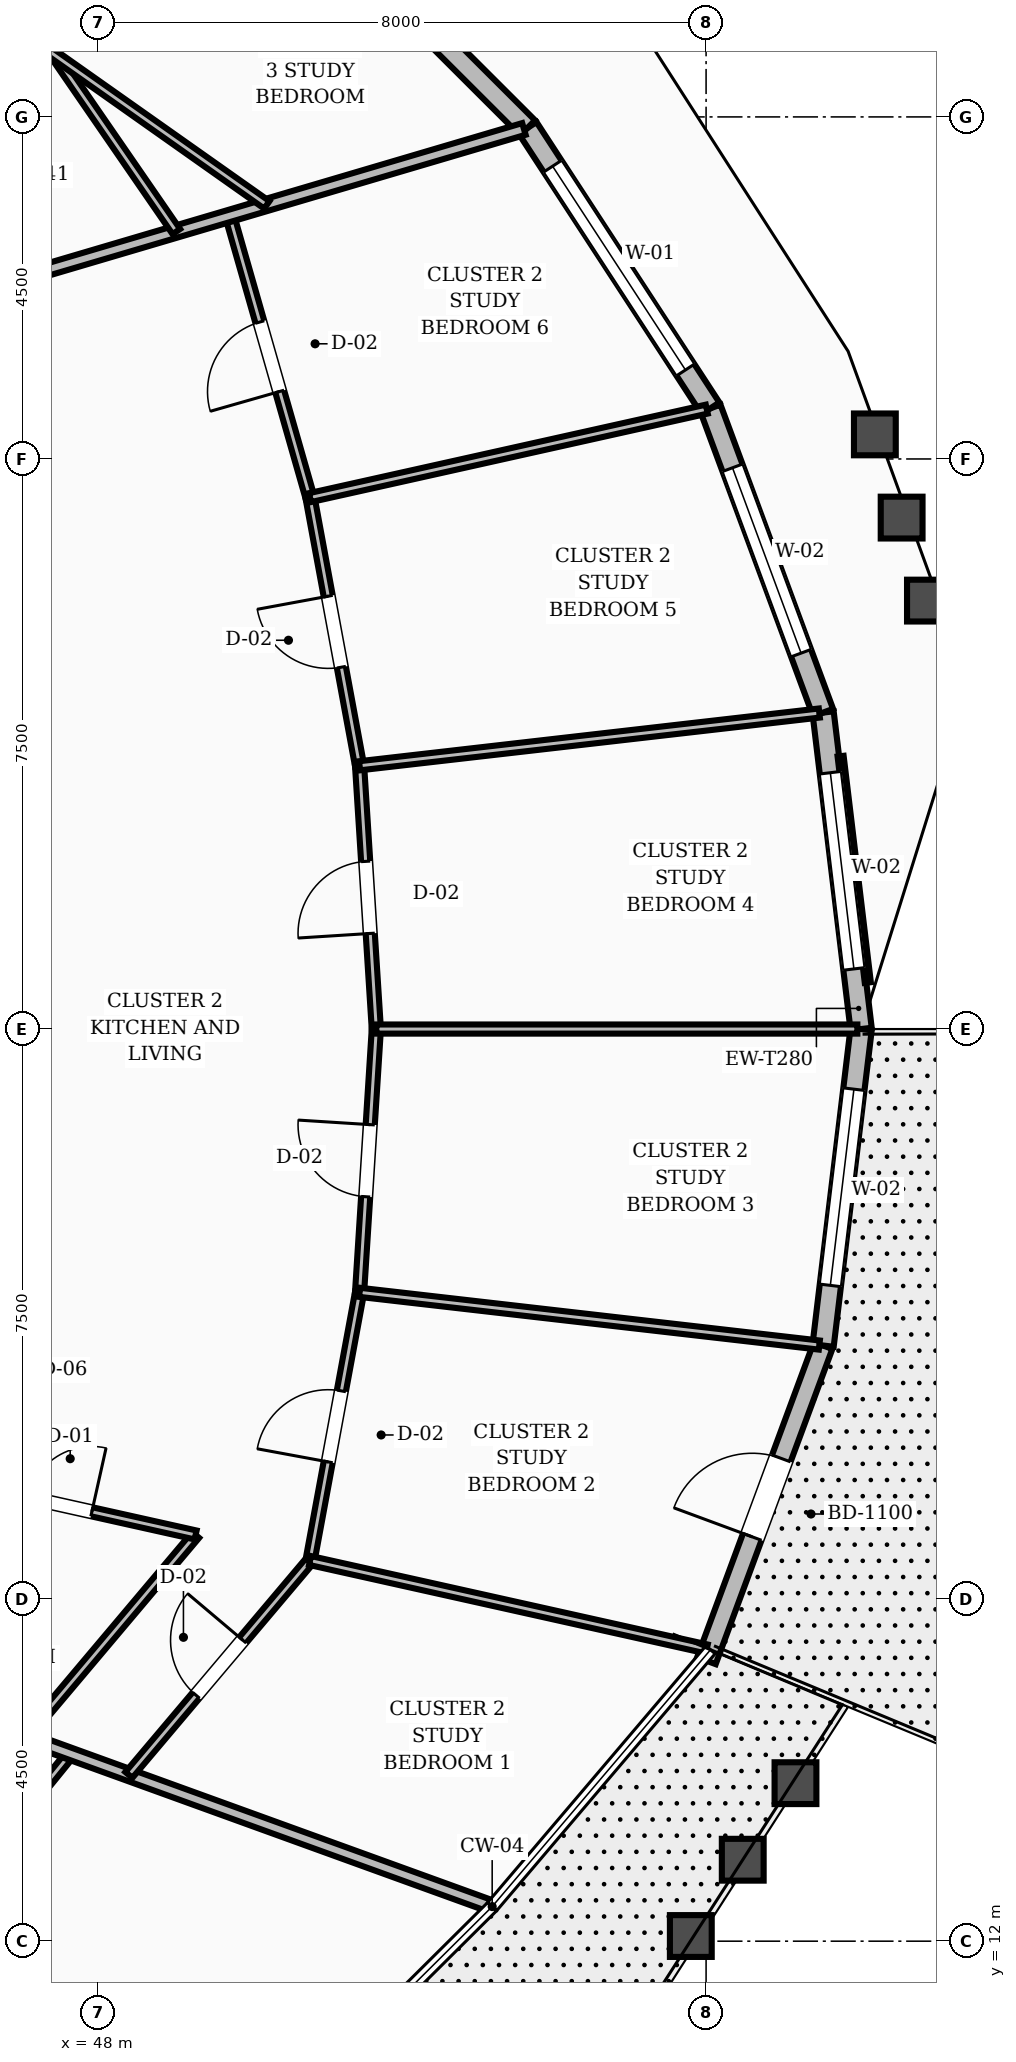
"""IFC4 building model, lengths in metres.
Left out: names, types, materials, properties, quantities, classifications, styles, units other than length and angle.
Written with IfcOpenShell. Run it as: python <this file> out.ifc"""

import sys

from ifc_helpers import new_model, si_unit, direction, frame, frame_2d, origin, place, context, subcontext, project, spatial, rectangle, extrude, element, fill, save


model = new_model("IFC4")
c1 = context("Model", 3, precision=1e-05, world=origin(), true_north=direction((0.0, 1.0)))
c2 = subcontext(c1, "Body", "Model", "MODEL_VIEW")
j1 = project(units=[si_unit("LENGTHUNIT", "METRE"), si_unit("PLANEANGLEUNIT", "RADIAN")], contexts=[c1])
p1 = place(None, origin())
s1 = spatial("IfcSite", under=j1, at=p1, CompositionType="ELEMENT")
p2 = place(p1, origin())
s2 = spatial("IfcBuilding", under=s1, at=p2, CompositionType="ELEMENT")
p3 = place(p2, frame((0.0, 0.0, 174.8)))
s3 = spatial("IfcBuildingStorey", under=s2, at=p3, CompositionType="ELEMENT", Elevation=174.8)
p4 = place(p3, frame((58.04, 24.0, 0.0), z_axis=(0.0, 0.0, 1.0), x_axis=(-0.119361035634, 0.992850916892, 0.0)))
e1 = element("IfcWall", 1, at=p4, inside=s3, PredefinedType="STANDARD", context=c2, shape_type="SweptSolid", body=[
    extrude(rectangle(XDim=4.193, YDim=0.28, at=frame_2d((2.097, 0.0))), origin(), (0.0, 0.0, 1.0), 2.82),
])
p5 = place(p4, frame((0.797, 0.0, 0.8)))
e2 = element("IfcOpeningElement", 2, at=p5, cuts=e1, PredefinedType="OPENING", context=c2, shape_type="SweptSolid", body=[
    extrude(rectangle(XDim=2.6, YDim=1.65, at=frame_2d((1.3, 0.825))), frame((0.0, 0.15, 0.0), z_axis=(0.0, -1.0, 0.0), x_axis=(1.0, 0.0, 0.0)), (0.0, 0.0, 1.0), 0.3),
])
p6 = place(p3, frame((57.54, 28.163, 0.0), z_axis=(0.0, 0.0, 1.0), x_axis=(-0.347096410893, 0.93782945227, 0.0)))
e3 = element("IfcWall", 3, at=p6, inside=s3, PredefinedType="STANDARD", context=c2, shape_type="SweptSolid", body=[
    extrude(rectangle(XDim=4.269, YDim=0.28, at=frame_2d((2.134, 0.0))), origin(), (0.0, 0.0, 1.0), 2.82),
])
p7 = place(p6, frame((0.834, 0.0, 0.8)))
e4 = element("IfcOpeningElement", 4, at=p7, cuts=e3, PredefinedType="OPENING", context=c2, shape_type="SweptSolid", body=[
    extrude(rectangle(XDim=2.6, YDim=1.65, at=frame_2d((1.3, 0.825))), frame((0.0, 0.15, 0.0), z_axis=(0.0, -1.0, 0.0), x_axis=(1.0, 0.0, 0.0)), (0.0, 0.0, 1.0), 0.3),
])
p8 = place(p3, frame((56.058, 32.167, 0.0), z_axis=(0.0, 0.0, 1.0), x_axis=(-0.54628130625, 0.837601775573, 0.0)))
e5 = element("IfcWall", 5, at=p8, inside=s3, PredefinedType="STANDARD", context=c2, shape_type="SweptSolid", body=[
    extrude(rectangle(XDim=4.405, YDim=0.28, at=frame_2d((2.202, 0.0))), origin(), (0.0, 0.0, 1.0), 2.82),
])
p9 = place(p8, frame((0.602, 0.0, 0.8)))
e6 = element("IfcOpeningElement", 6, at=p9, cuts=e5, PredefinedType="OPENING", context=c2, shape_type="SweptSolid", body=[
    extrude(rectangle(XDim=3.2, YDim=1.65, at=frame_2d((1.6, 0.825))), frame((0.0, 0.15, 0.0), z_axis=(0.0, -1.0, 0.0), x_axis=(1.0, 0.0, 0.0)), (0.0, 0.0, 1.0), 0.3),
])
p10 = place(p3, frame((53.652, 35.856, 0.0), z_axis=(0.0, 0.0, 1.0), x_axis=(-0.707640043992, 0.706573115919, 0.0)))
e7 = element("IfcWall", 7, at=p10, inside=s3, PredefinedType="STANDARD", context=c2, shape_type="SweptSolid", body=[
    extrude(rectangle(XDim=4.576, YDim=0.28, at=frame_2d((2.288, 0.0))), origin(), (0.0, 0.0, 1.0), 2.82),
])
p11 = place(p3, frame((56.005, 15.69, 0.0), z_axis=(0.0, 0.0, 1.0), x_axis=(0.347096775118, 0.937829317468, 0.0)))
e8 = element("IfcWall", 8, at=p11, inside=s3, PredefinedType="STANDARD", context=c2, shape_type="SweptSolid", body=[
    extrude(rectangle(XDim=4.422, YDim=0.26, at=frame_2d((2.211, 0.0))), origin(), (0.0, 0.0, 1.0), 2.82),
])
p12 = place(p11, frame((1.738, 0.0, 0.0)))
e9 = element("IfcOpeningElement", 9, at=p12, cuts=e8, PredefinedType="OPENING", context=c2, shape_type="SweptSolid", body=[
    extrude(rectangle(XDim=1.1, YDim=2.15, at=frame_2d((0.55, 1.075))), frame((0.0, 0.14, 0.0), z_axis=(0.0, -1.0, 0.0), x_axis=(1.0, 0.0, 0.0)), (0.0, 0.0, 1.0), 0.28),
])
p13 = place(p3, frame((57.54, 19.837, 0.0), z_axis=(0.0, 0.0, 1.0), x_axis=(0.119361035634, 0.992850916892, 0.0)))
e10 = element("IfcWall", 10, at=p13, inside=s3, PredefinedType="STANDARD", context=c2, shape_type="SweptSolid", body=[
    extrude(rectangle(XDim=4.193, YDim=0.28, at=frame_2d((2.097, 0.0))), origin(), (0.0, 0.0, 1.0), 2.82),
])
p14 = place(p13, frame((0.797, 0.0, 0.8)))
e11 = element("IfcOpeningElement", 11, at=p14, cuts=e10, PredefinedType="OPENING", context=c2, shape_type="SweptSolid", body=[
    extrude(rectangle(XDim=2.6, YDim=1.65, at=frame_2d((1.3, 0.825))), frame((0.0, 0.15, 0.0), z_axis=(0.0, -1.0, 0.0), x_axis=(1.0, 0.0, 0.0)), (0.0, 0.0, 1.0), 0.3),
])
p15 = place(p3, frame((45.424, 11.74, 0.0), z_axis=(0.0, 0.0, 1.0), x_axis=(0.630511474319, 0.776179928079, 0.0)))
e12 = element("IfcWall", 12, at=p15, inside=s3, PredefinedType="PARTITIONING", context=c2, shape_type="SweptSolid", body=[
    extrude(rectangle(XDim=3.511, YDim=0.12, at=frame_2d((1.756, 0.0))), origin(), (0.0, 0.0, 1.0), 2.8),
])
p16 = place(p3, frame((44.65, 15.548, 0.0), z_axis=(0.0, 0.0, 1.0), x_axis=(0.940209575336, -0.340596468636, 0.0)))
e13 = element("IfcWall", 13, at=p16, inside=s3, PredefinedType="SOLIDWALL", context=c2, shape_type="SweptSolid", body=[
    extrude(rectangle(XDim=9.029, YDim=0.16, at=frame_2d((4.514, 0.0))), origin(), (0.0, 0.0, 1.0), 2.8),
])
p17 = place(p3, frame((47.04, 14.682, 0.0), z_axis=(0.0, 0.0, 1.0), x_axis=(0.644463857784, 0.764634772954, 0.0)))
e14 = element("IfcWall", 14, at=p17, inside=s3, PredefinedType="PARTITIONING", context=c2, shape_type="SweptSolid", body=[
    extrude(rectangle(XDim=3.482, YDim=0.12, at=frame_2d((1.741, 0.0))), origin(), (0.0, 0.0, 1.0), 2.8),
])
p18 = place(p3, frame((46.65, 17.932, 0.0), z_axis=(0.0, 0.0, 1.0), x_axis=(0.976010083103, -0.217725326231, 0.0)))
e15 = element("IfcWall", 15, at=p18, inside=s3, PredefinedType="PARTITIONING", context=c2, shape_type="SweptSolid", body=[
    extrude(rectangle(XDim=2.699, YDim=0.12, at=frame_2d((1.35, 0.0))), origin(), (0.0, 0.0, 1.0), 2.8),
])
p19 = place(p18, frame((0.44, 0.0, 0.0)))
e16 = element("IfcOpeningElement", 16, at=p19, cuts=e15, PredefinedType="OPENING", context=c2, shape_type="SweptSolid", body=[
    extrude(rectangle(XDim=0.86, YDim=2.1, at=frame_2d((0.43, 1.05))), frame((0.0, 0.07, 0.0), z_axis=(0.0, -1.0, 0.0), x_axis=(1.0, 0.0, 0.0)), (0.0, 0.0, 1.0), 0.14),
])
p20 = place(p3, frame((48.406, 14.187, 0.0), z_axis=(0.0, 0.0, 1.0), x_axis=(0.645325713634, 0.763907535846, 0.0)))
e17 = element("IfcWall", 17, at=p20, inside=s3, PredefinedType="PARTITIONING", context=c2, shape_type="SweptSolid", body=[
    extrude(rectangle(XDim=3.694, YDim=0.12, at=frame_2d((1.847, 0.0))), origin(), (0.0, 0.0, 1.0), 2.8),
])
p21 = place(p20, frame((1.372, 0.0, 0.0)))
e18 = element("IfcOpeningElement", 18, at=p21, cuts=e17, PredefinedType="OPENING", context=c2, shape_type="SweptSolid", body=[
    extrude(rectangle(XDim=0.95, YDim=2.1, at=frame_2d((0.475, 1.05))), frame((0.0, 0.07, 0.0), z_axis=(0.0, -1.0, 0.0), x_axis=(1.0, 0.0, 0.0)), (0.0, 0.0, 1.0), 0.14),
])
p22 = place(p3, frame((50.789, 17.009, 0.0), z_axis=(0.0, 0.0, 1.0), x_axis=(0.18176514898, 0.983341970332, 0.0)))
e19 = element("IfcWall", 19, at=p22, inside=s3, PredefinedType="PARTITIONING", context=c2, shape_type="SweptSolid", body=[
    extrude(rectangle(XDim=3.588, YDim=0.12, at=frame_2d((1.794, 0.0))), origin(), (0.0, 0.0, 1.0), 2.8),
])
p23 = place(p22, frame((1.319, 0.0, 0.0)))
e20 = element("IfcOpeningElement", 20, at=p23, cuts=e19, PredefinedType="OPENING", context=c2, shape_type="SweptSolid", body=[
    extrude(rectangle(XDim=0.95, YDim=2.1, at=frame_2d((0.475, 1.05))), frame((0.0, 0.07, 0.0), z_axis=(0.0, -1.0, 0.0), x_axis=(1.0, 0.0, 0.0)), (0.0, 0.0, 1.0), 0.14),
])
p24 = place(p3, frame((50.789, 17.009, 0.0), z_axis=(0.0, 0.0, 1.0), x_axis=(0.976023513378, -0.217665112806, 0.0)))
e21 = element("IfcWall", 21, at=p24, inside=s3, PredefinedType="PARTITIONING", context=c2, shape_type="SweptSolid", body=[
    extrude(rectangle(XDim=5.348, YDim=0.12, at=frame_2d((2.674, 0.0))), origin(), (0.0, 0.0, 1.0), 2.8),
])
p25 = place(p3, frame((51.441, 20.536, 0.0), z_axis=(0.0, 0.0, 1.0), x_axis=(0.063451217103, 0.997984941293, 0.0)))
e22 = element("IfcWall", 22, at=p25, inside=s3, PredefinedType="PARTITIONING", context=c2, shape_type="SweptSolid", body=[
    extrude(rectangle(XDim=3.471, YDim=0.12, at=frame_2d((1.735, 0.0))), origin(), (0.0, 0.0, 1.0), 2.8),
])
p26 = place(p25, frame((1.26, 0.0, 0.0)))
e23 = element("IfcOpeningElement", 23, at=p26, cuts=e22, PredefinedType="OPENING", context=c2, shape_type="SweptSolid", body=[
    extrude(rectangle(XDim=0.95, YDim=2.1, at=frame_2d((0.475, 1.05))), frame((0.0, 0.07, 0.0), z_axis=(0.0, -1.0, 0.0), x_axis=(1.0, 0.0, 0.0)), (0.0, 0.0, 1.0), 0.14),
])
p27 = place(p3, frame((51.441, 20.536, 0.0), z_axis=(0.0, 0.0, 1.0), x_axis=(0.993484761462, -0.11396503298, 0.0)))
e24 = element("IfcWall", 24, at=p27, inside=s3, PredefinedType="PARTITIONING", context=c2, shape_type="SweptSolid", body=[
    extrude(rectangle(XDim=6.088, YDim=0.12, at=frame_2d((3.044, 0.0))), origin(), (0.0, 0.0, 1.0), 2.8),
])
p28 = place(p3, frame((51.662, 24.0, 0.0), z_axis=(0.0, 0.0, 1.0), x_axis=(-0.063451217103, 0.997984941293, 0.0)))
e25 = element("IfcWall", 25, at=p28, inside=s3, PredefinedType="PARTITIONING", context=c2, shape_type="SweptSolid", body=[
    extrude(rectangle(XDim=3.471, YDim=0.12, at=frame_2d((1.735, 0.0))), origin(), (0.0, 0.0, 1.0), 2.8),
])
p29 = place(p28, frame((1.26, 0.0, 0.0)))
e26 = element("IfcOpeningElement", 26, at=p29, cuts=e25, PredefinedType="OPENING", context=c2, shape_type="SweptSolid", body=[
    extrude(rectangle(XDim=0.95, YDim=2.1, at=frame_2d((0.475, 1.05))), frame((0.0, 0.07, 0.0), z_axis=(0.0, -1.0, 0.0), x_axis=(1.0, 0.0, 0.0)), (0.0, 0.0, 1.0), 0.14),
])
p30 = place(p3, frame((51.662, 24.0, 0.0), z_axis=(0.0, 0.0, 1.0), x_axis=(1.0, 0.0, 0.0)))
e27 = element("IfcWall", 27, at=p30, inside=s3, PredefinedType="PARTITIONING", context=c2, shape_type="SweptSolid", body=[
    extrude(rectangle(XDim=6.328, YDim=0.12, at=frame_2d((3.164, 0.0))), origin(), (0.0, 0.0, 1.0), 2.8),
])
p31 = place(p3, frame((51.441, 27.464, 0.0), z_axis=(0.0, 0.0, 1.0), x_axis=(-0.18176514898, 0.983341970332, 0.0)))
e28 = element("IfcWall", 28, at=p31, inside=s3, PredefinedType="PARTITIONING", context=c2, shape_type="SweptSolid", body=[
    extrude(rectangle(XDim=3.588, YDim=0.12, at=frame_2d((1.794, 0.0))), origin(), (0.0, 0.0, 1.0), 2.8),
])
p32 = place(p31, frame((1.319, 0.0, 0.0)))
e29 = element("IfcOpeningElement", 29, at=p32, cuts=e28, PredefinedType="OPENING", context=c2, shape_type="SweptSolid", body=[
    extrude(rectangle(XDim=0.95, YDim=2.1, at=frame_2d((0.475, 1.05))), frame((0.0, 0.07, 0.0), z_axis=(0.0, -1.0, 0.0), x_axis=(1.0, 0.0, 0.0)), (0.0, 0.0, 1.0), 0.14),
])
p33 = place(p3, frame((51.441, 27.464, 0.0), z_axis=(0.0, 0.0, 1.0), x_axis=(0.993484761462, 0.11396503298, 0.0)))
e30 = element("IfcWall", 30, at=p33, inside=s3, PredefinedType="PARTITIONING", context=c2, shape_type="SweptSolid", body=[
    extrude(rectangle(XDim=6.088, YDim=0.12, at=frame_2d((3.044, 0.0))), origin(), (0.0, 0.0, 1.0), 2.8),
])
p34 = place(p3, frame((50.789, 30.991, 0.0), z_axis=(0.0, 0.0, 1.0), x_axis=(-0.274604022912, 0.961557398495, 0.0)))
e31 = element("IfcWall", 31, at=p34, inside=s3, PredefinedType="PARTITIONING", context=c2, shape_type="SweptSolid", body=[
    extrude(rectangle(XDim=3.855, YDim=0.12, at=frame_2d((1.927, 0.0))), origin(), (0.0, 0.0, 1.0), 2.8),
])
p35 = place(p34, frame((1.452, 0.0, 0.0)))
e32 = element("IfcOpeningElement", 32, at=p35, cuts=e31, PredefinedType="OPENING", context=c2, shape_type="SweptSolid", body=[
    extrude(rectangle(XDim=0.95, YDim=2.1, at=frame_2d((0.475, 1.05))), frame((0.0, 0.07, 0.0), z_axis=(0.0, -1.0, 0.0), x_axis=(1.0, 0.0, 0.0)), (0.0, 0.0, 1.0), 0.14),
])
p36 = place(p3, frame((50.789, 30.991, 0.0), z_axis=(0.0, 0.0, 1.0), x_axis=(0.976023513378, 0.217665112806, 0.0)))
e33 = element("IfcWall", 33, at=p36, inside=s3, PredefinedType="PARTITIONING", context=c2, shape_type="SweptSolid", body=[
    extrude(rectangle(XDim=5.348, YDim=0.12, at=frame_2d((2.674, 0.0))), origin(), (0.0, 0.0, 1.0), 2.8),
])
p37 = place(p3, frame((46.65, 33.789, 0.0), z_axis=(0.0, 0.0, 1.0), x_axis=(0.959073837525, 0.283156095069, 0.0)))
e34 = element("IfcWall", 34, at=p37, inside=s3, PredefinedType="SOLIDWALL", context=c2, shape_type="SweptSolid", body=[
    extrude(rectangle(XDim=7.25, YDim=0.16, at=frame_2d((3.625, 0.0))), origin(), (0.0, 0.0, 1.0), 2.8),
])
p38 = place(p3, frame((49.031, 34.492, 0.0), z_axis=(0.0, 0.0, 1.0), x_axis=(-0.567383758206, 0.823453502588, 0.0)))
e35 = element("IfcWall", 35, at=p38, inside=s3, PredefinedType="PARTITIONING", context=c2, shape_type="SweptSolid", body=[
    extrude(rectangle(XDim=3.889, YDim=0.12, at=frame_2d((1.944, 0.0))), origin(), (0.0, 0.0, 1.0), 2.8),
])
p39 = place(p3, frame((50.221, 34.843, 0.0), z_axis=(0.0, 0.0, 1.0), x_axis=(-0.817010879992, 0.57662225241, 0.0)))
e36 = element("IfcWall", 36, at=p39, inside=s3, PredefinedType="PARTITIONING", context=c2, shape_type="SweptSolid", body=[
    extrude(rectangle(XDim=8.021, YDim=0.12, at=frame_2d((4.011, 0.0))), origin(), (0.0, 0.0, 1.0), 2.8),
])
p40 = place(p39, frame((4.898, 0.0, 0.0)))
e37 = element("IfcOpeningElement", 37, at=p40, cuts=e36, PredefinedType="OPENING", context=c2, shape_type="SweptSolid", body=[
    extrude(rectangle(XDim=0.95, YDim=2.1, at=frame_2d((0.475, 1.05))), frame((0.0, 0.07, 0.0), z_axis=(0.0, -1.0, 0.0), x_axis=(1.0, 0.0, 0.0)), (0.0, 0.0, 1.0), 0.14),
])
p41 = place(p5, origin())
e38 = element("IfcWindow", 38, at=p41, inside=s3, PartitioningType="SINGLE_PANEL", PredefinedType="WINDOW", context=c2, shape_type="SweptSolid", body=[
    extrude(rectangle(XDim=2.6, YDim=1.65, at=frame_2d((1.3, 0.825))), frame((0.0, 0.03, 0.0), z_axis=(0.0, -1.0, 0.0), x_axis=(1.0, 0.0, 0.0)), (0.0, 0.0, 1.0), 0.06),
])
fill(e2, e38)
p42 = place(p7, origin())
e39 = element("IfcWindow", 39, at=p42, inside=s3, PartitioningType="SINGLE_PANEL", PredefinedType="WINDOW", context=c2, shape_type="SweptSolid", body=[
    extrude(rectangle(XDim=2.6, YDim=1.65, at=frame_2d((1.3, 0.825))), frame((0.0, 0.03, 0.0), z_axis=(0.0, -1.0, 0.0), x_axis=(1.0, 0.0, 0.0)), (0.0, 0.0, 1.0), 0.06),
])
fill(e4, e39)
p43 = place(p9, origin())
e40 = element("IfcWindow", 40, at=p43, inside=s3, PartitioningType="SINGLE_PANEL", PredefinedType="WINDOW", context=c2, shape_type="SweptSolid", body=[
    extrude(rectangle(XDim=3.2, YDim=1.65, at=frame_2d((1.6, 0.825))), frame((0.0, 0.03, 0.0), z_axis=(0.0, -1.0, 0.0), x_axis=(1.0, 0.0, 0.0)), (0.0, 0.0, 1.0), 0.06),
])
fill(e6, e40)
p44 = place(p12, origin())
e41 = element("IfcDoor", 41, at=p44, inside=s3, OperationType="SINGLE_SWING_LEFT", PredefinedType="DOOR", context=c2, shape_type="SweptSolid", body=[
    extrude(rectangle(XDim=1.1, YDim=2.15, at=frame_2d((0.55, 1.075))), frame((0.0, 0.025, 0.0), z_axis=(0.0, -1.0, 0.0), x_axis=(1.0, 0.0, 0.0)), (0.0, 0.0, 1.0), 0.05),
])
fill(e9, e41)
p45 = place(p14, origin())
e42 = element("IfcWindow", 42, at=p45, inside=s3, PartitioningType="SINGLE_PANEL", PredefinedType="WINDOW", context=c2, shape_type="SweptSolid", body=[
    extrude(rectangle(XDim=2.6, YDim=1.65, at=frame_2d((1.3, 0.825))), frame((0.0, 0.03, 0.0), z_axis=(0.0, -1.0, 0.0), x_axis=(1.0, 0.0, 0.0)), (0.0, 0.0, 1.0), 0.06),
])
fill(e11, e42)
p46 = place(p19, origin())
e43 = element("IfcDoor", 43, at=p46, inside=s3, OperationType="SINGLE_SWING_RIGHT", PredefinedType="DOOR", context=c2, shape_type="SweptSolid", body=[
    extrude(rectangle(XDim=0.86, YDim=2.1, at=frame_2d((0.43, 1.05))), frame((0.0, 0.025, 0.0), z_axis=(0.0, -1.0, 0.0), x_axis=(1.0, 0.0, 0.0)), (0.0, 0.0, 1.0), 0.05),
])
fill(e16, e43)
p47 = place(p21, origin())
e44 = element("IfcDoor", 44, at=p47, inside=s3, OperationType="SINGLE_SWING_RIGHT", PredefinedType="DOOR", context=c2, shape_type="SweptSolid", body=[
    extrude(rectangle(XDim=0.95, YDim=2.1, at=frame_2d((0.475, 1.05))), frame((0.0, 0.025, 0.0), z_axis=(0.0, -1.0, 0.0), x_axis=(1.0, 0.0, 0.0)), (0.0, 0.0, 1.0), 0.05),
])
fill(e18, e44)
p48 = place(p23, origin())
e45 = element("IfcDoor", 45, at=p48, inside=s3, OperationType="SINGLE_SWING_LEFT", PredefinedType="DOOR", context=c2, shape_type="SweptSolid", body=[
    extrude(rectangle(XDim=0.95, YDim=2.1, at=frame_2d((0.475, 1.05))), frame((0.0, 0.025, 0.0), z_axis=(0.0, -1.0, 0.0), x_axis=(1.0, 0.0, 0.0)), (0.0, 0.0, 1.0), 0.05),
])
fill(e20, e45)
p49 = place(p26, origin())
e46 = element("IfcDoor", 46, at=p49, inside=s3, OperationType="SINGLE_SWING_RIGHT", PredefinedType="DOOR", context=c2, shape_type="SweptSolid", body=[
    extrude(rectangle(XDim=0.95, YDim=2.1, at=frame_2d((0.475, 1.05))), frame((0.0, 0.025, 0.0), z_axis=(0.0, -1.0, 0.0), x_axis=(1.0, 0.0, 0.0)), (0.0, 0.0, 1.0), 0.05),
])
fill(e23, e46)
p50 = place(p29, origin())
e47 = element("IfcDoor", 47, at=p50, inside=s3, OperationType="SINGLE_SWING_LEFT", PredefinedType="DOOR", context=c2, shape_type="SweptSolid", body=[
    extrude(rectangle(XDim=0.95, YDim=2.1, at=frame_2d((0.475, 1.05))), frame((0.0, 0.025, 0.0), z_axis=(0.0, -1.0, 0.0), x_axis=(1.0, 0.0, 0.0)), (0.0, 0.0, 1.0), 0.05),
])
fill(e26, e47)
p51 = place(p32, origin())
e48 = element("IfcDoor", 48, at=p51, inside=s3, OperationType="SINGLE_SWING_RIGHT", PredefinedType="DOOR", context=c2, shape_type="SweptSolid", body=[
    extrude(rectangle(XDim=0.95, YDim=2.1, at=frame_2d((0.475, 1.05))), frame((0.0, 0.025, 0.0), z_axis=(0.0, -1.0, 0.0), x_axis=(1.0, 0.0, 0.0)), (0.0, 0.0, 1.0), 0.05),
])
fill(e29, e48)
p52 = place(p35, origin())
e49 = element("IfcDoor", 49, at=p52, inside=s3, OperationType="SINGLE_SWING_LEFT", PredefinedType="DOOR", context=c2, shape_type="SweptSolid", body=[
    extrude(rectangle(XDim=0.95, YDim=2.1, at=frame_2d((0.475, 1.05))), frame((0.0, 0.025, 0.0), z_axis=(0.0, -1.0, 0.0), x_axis=(1.0, 0.0, 0.0)), (0.0, 0.0, 1.0), 0.05),
])
fill(e32, e49)
save(model, sys.argv[1])
